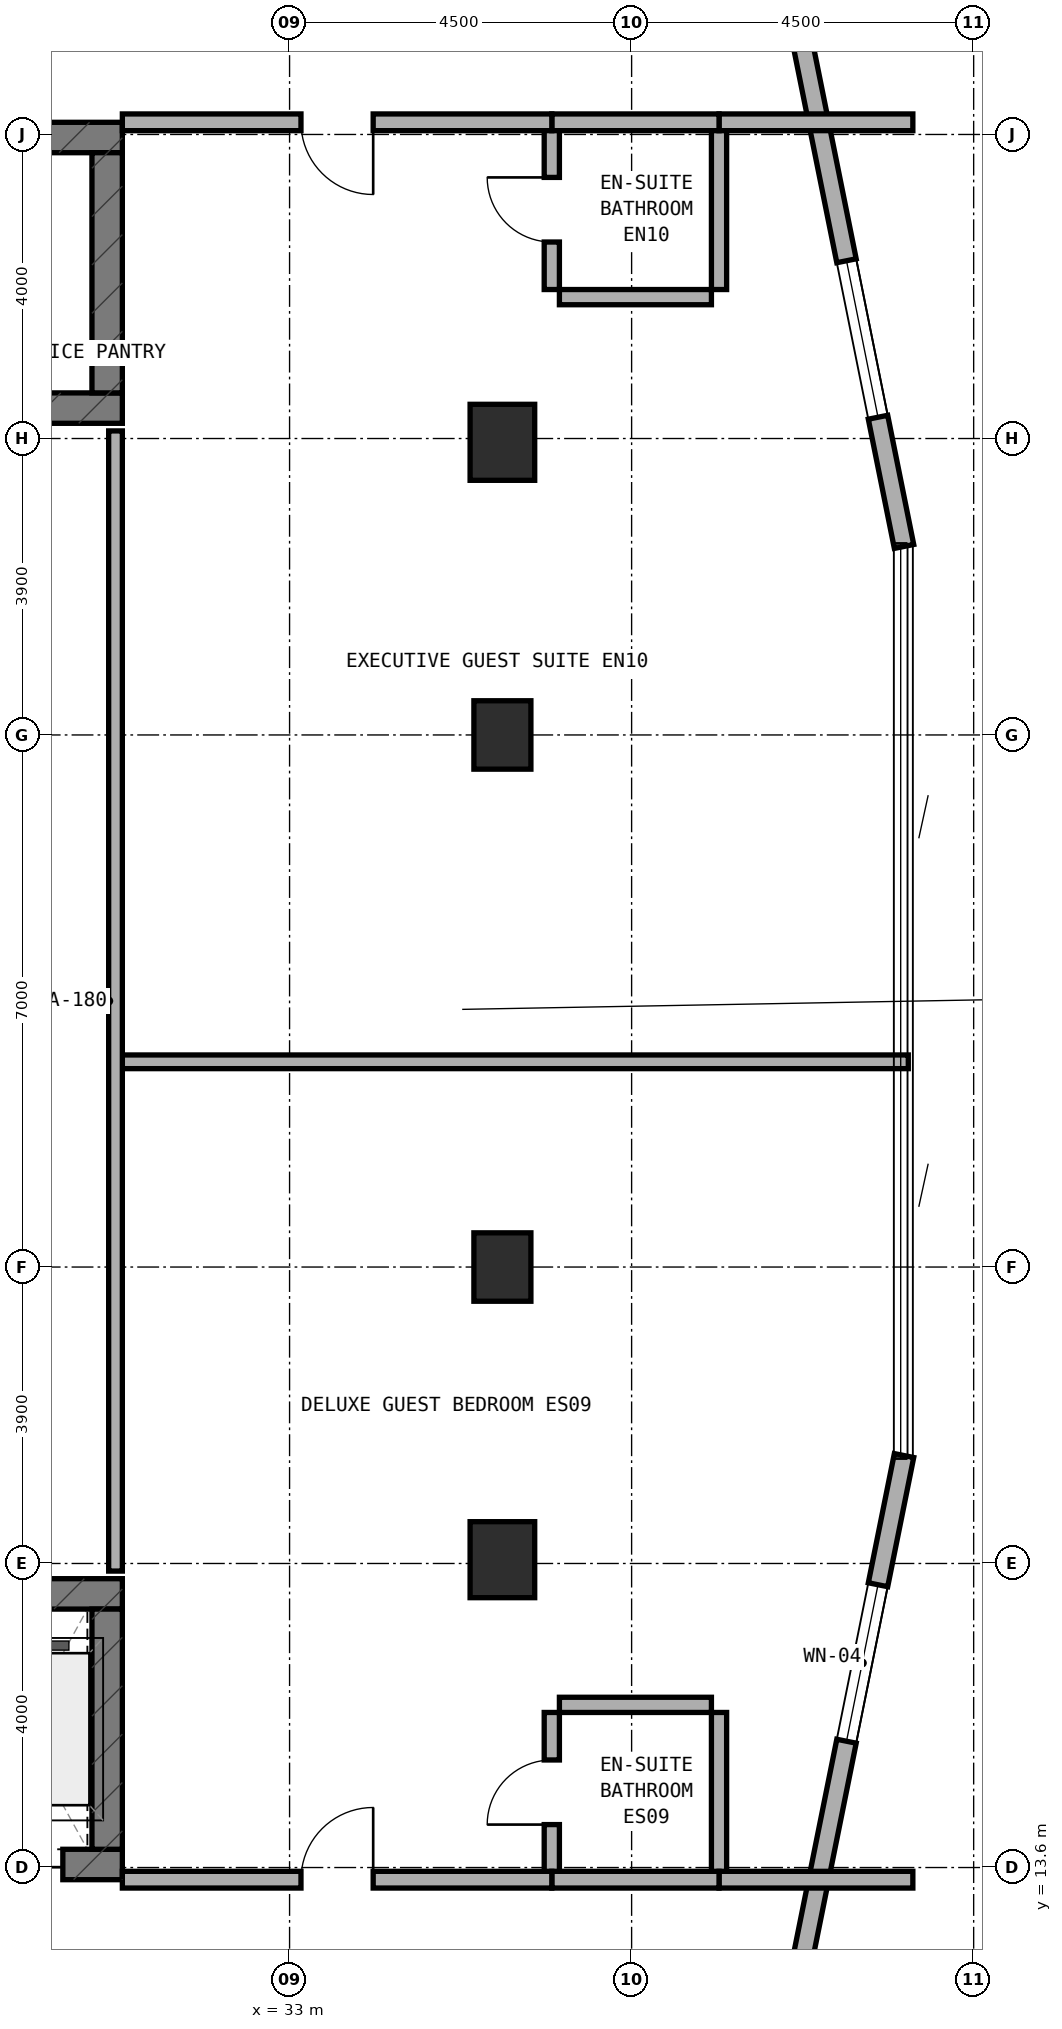
"""IFC4 building model, lengths in metres.
Left out: names, types, materials, properties, quantities, classifications, styles, units other than length and angle.
Written with IfcOpenShell. Run it as: python <this file> out.ifc"""

import sys

from ifc_helpers import new_model, si_unit, direction, frame, frame_2d, origin, origin_2d, place, context, subcontext, project, spatial, rectangle, extrude, element, fill, save


model = new_model("IFC4")
c1 = context("Model", 3, precision=1e-05, world=origin(), true_north=direction((0.0, 1.0)))
c2 = subcontext(c1, "Body", "Model", "MODEL_VIEW")
j1 = project(units=[si_unit("LENGTHUNIT", "METRE"), si_unit("PLANEANGLEUNIT", "RADIAN")], contexts=[c1])
p1 = place(None, origin())
s1 = spatial("IfcSite", under=j1, at=p1, CompositionType="ELEMENT")
p2 = place(p1, origin())
s2 = spatial("IfcBuilding", under=s1, at=p2, CompositionType="ELEMENT")
p3 = place(p2, frame((0.0, 0.0, 145.0)))
s3 = spatial("IfcBuildingStorey", under=s2, at=p3, CompositionType="ELEMENT", Elevation=145.0)
p4 = place(p3, frame((6.4, 32.8, 0.0), z_axis=(0.0, 0.0, 1.0), x_axis=(1.0, 0.0, 0.0)))
e1 = element("IfcWall", 1, at=p4, inside=s3, PredefinedType="SHEAR", context=c2, shape_type="SweptSolid", body=[
    extrude(rectangle(XDim=24.4, YDim=0.4, at=frame_2d((12.2, 0.0))), origin(), (0.0, 0.0, 1.0), 3.5),
])
p5 = place(p4, frame((6.05, 0.0, 0.0)))
e2 = element("IfcOpeningElement", 2, at=p5, cuts=e1, PredefinedType="OPENING", context=c2, shape_type="SweptSolid", body=[
    extrude(rectangle(XDim=1.1, YDim=2.15, at=frame_2d((0.55, 1.075))), frame((0.0, 0.21, 0.0), z_axis=(0.0, -1.0, 0.0), x_axis=(1.0, 0.0, 0.0)), (0.0, 0.0, 1.0), 0.42),
])
p6 = place(p3, frame((6.4, 36.36, 0.0), z_axis=(0.0, 0.0, 1.0), x_axis=(1.0, 0.0, 0.0)))
e3 = element("IfcWall", 3, at=p6, inside=s3, PredefinedType="SHEAR", context=c2, shape_type="SweptSolid", body=[
    extrude(rectangle(XDim=24.4, YDim=0.4, at=frame_2d((12.2, 0.0))), origin(), (0.0, 0.0, 1.0), 3.5),
])
p7 = place(p6, frame((9.15, 0.0, 0.0)))
e4 = element("IfcOpeningElement", 4, at=p7, cuts=e3, PredefinedType="OPENING", context=c2, shape_type="SweptSolid", body=[
    extrude(rectangle(XDim=1.2, YDim=2.15, at=frame_2d((0.6, 1.075))), frame((0.0, 0.21, 0.0), z_axis=(0.0, -1.0, 0.0), x_axis=(1.0, 0.0, 0.0)), (0.0, 0.0, 1.0), 0.42),
])
p8 = place(p6, frame((19.2, 0.0, 0.0)))
e5 = element("IfcOpeningElement", 5, at=p8, cuts=e3, PredefinedType="OPENING", context=c2, shape_type="SweptSolid", body=[
    extrude(rectangle(XDim=0.85, YDim=2.1, at=frame_2d((0.425, 1.05))), frame((0.0, 0.21, 0.0), z_axis=(0.0, -1.0, 0.0), x_axis=(1.0, 0.0, 0.0)), (0.0, 0.0, 1.0), 0.42),
])
p9 = place(p6, frame((17.22, 0.0, 0.0)))
e6 = element("IfcOpeningElement", 6, at=p9, cuts=e3, PredefinedType="OPENING", context=c2, shape_type="SweptSolid", body=[
    extrude(rectangle(XDim=0.85, YDim=2.1, at=frame_2d((0.425, 1.05))), frame((0.0, 0.21, 0.0), z_axis=(0.0, -1.0, 0.0), x_axis=(1.0, 0.0, 0.0)), (0.0, 0.0, 1.0), 0.42),
])
p10 = place(p3, frame((30.6, 33.0, 0.0), z_axis=(0.0, 0.0, 1.0), x_axis=(0.0, 1.0, 0.0)))
e7 = element("IfcWall", 7, at=p10, inside=s3, PredefinedType="SHEAR", context=c2, shape_type="SweptSolid", body=[
    extrude(rectangle(XDim=3.16, YDim=0.4, at=frame_2d((1.58, 0.0))), origin(), (0.0, 0.0, 1.0), 3.5),
])
p11 = place(p3, frame((6.4, 13.64, 0.0), z_axis=(0.0, 0.0, 1.0), x_axis=(1.0, 0.0, 0.0)))
e8 = element("IfcWall", 8, at=p11, inside=s3, PredefinedType="SHEAR", context=c2, shape_type="SweptSolid", body=[
    extrude(rectangle(XDim=24.4, YDim=0.4, at=frame_2d((12.2, 0.0))), origin(), (0.0, 0.0, 1.0), 3.5),
])
p12 = place(p11, frame((9.15, 0.0, 0.0)))
e9 = element("IfcOpeningElement", 9, at=p12, cuts=e8, PredefinedType="OPENING", context=c2, shape_type="SweptSolid", body=[
    extrude(rectangle(XDim=1.2, YDim=2.15, at=frame_2d((0.6, 1.075))), frame((0.0, 0.21, 0.0), z_axis=(0.0, -1.0, 0.0), x_axis=(1.0, 0.0, 0.0)), (0.0, 0.0, 1.0), 0.42),
])
p13 = place(p11, frame((17.22, 0.0, 0.0)))
e10 = element("IfcOpeningElement", 10, at=p13, cuts=e8, PredefinedType="OPENING", context=c2, shape_type="SweptSolid", body=[
    extrude(rectangle(XDim=0.85, YDim=2.1, at=frame_2d((0.425, 1.05))), frame((0.0, 0.21, 0.0), z_axis=(0.0, -1.0, 0.0), x_axis=(1.0, 0.0, 0.0)), (0.0, 0.0, 1.0), 0.42),
])
p14 = place(p11, frame((18.783, 0.0, 0.0)))
e11 = element("IfcOpeningElement", 11, at=p14, cuts=e8, PredefinedType="OPENING", context=c2, shape_type="SweptSolid", body=[
    extrude(rectangle(XDim=1.1, YDim=2.15, at=frame_2d((0.55, 1.075))), frame((0.0, 0.21, 0.0), z_axis=(0.0, -1.0, 0.0), x_axis=(1.0, 0.0, 0.0)), (0.0, 0.0, 1.0), 0.42),
])
p15 = place(p11, frame((20.65, 0.0, 0.0)))
e12 = element("IfcOpeningElement", 12, at=p15, cuts=e8, PredefinedType="OPENING", context=c2, shape_type="SweptSolid", body=[
    extrude(rectangle(XDim=1.1, YDim=2.15, at=frame_2d((0.55, 1.075))), frame((0.0, 0.21, 0.0), z_axis=(0.0, -1.0, 0.0), x_axis=(1.0, 0.0, 0.0)), (0.0, 0.0, 1.0), 0.42),
])
p16 = place(p11, frame((22.517, 0.0, 0.0)))
e13 = element("IfcOpeningElement", 13, at=p16, cuts=e8, PredefinedType="OPENING", context=c2, shape_type="SweptSolid", body=[
    extrude(rectangle(XDim=1.1, YDim=2.15, at=frame_2d((0.55, 1.075))), frame((0.0, 0.21, 0.0), z_axis=(0.0, -1.0, 0.0), x_axis=(1.0, 0.0, 0.0)), (0.0, 0.0, 1.0), 0.42),
])
p17 = place(p3, frame((6.4, 17.2, 0.0), z_axis=(0.0, 0.0, 1.0), x_axis=(1.0, 0.0, 0.0)))
e14 = element("IfcWall", 14, at=p17, inside=s3, PredefinedType="SHEAR", context=c2, shape_type="SweptSolid", body=[
    extrude(rectangle(XDim=24.4, YDim=0.4, at=frame_2d((12.2, 0.0))), origin(), (0.0, 0.0, 1.0), 3.5),
])
p18 = place(p3, frame((30.6, 13.84, 0.0), z_axis=(0.0, 0.0, 1.0), x_axis=(0.0, 1.0, 0.0)))
e15 = element("IfcWall", 15, at=p18, inside=s3, PredefinedType="SHEAR", context=c2, shape_type="SweptSolid", body=[
    extrude(rectangle(XDim=3.16, YDim=0.4, at=frame_2d((1.58, 0.0))), origin(), (0.0, 0.0, 1.0), 3.5),
])
for number, where, z_axis, x_axis in (
    (16, (35.8, 21.5, 0.0), (0.0, 0.0, 1.0), (1.0, 0.0, 0.0)),
    (17, (35.8, 28.5, 0.0), (0.0, 0.0, 1.0), (1.0, 0.0, 0.0)),
):
    element("IfcColumn", number, at=place(p3, frame(where, z_axis=z_axis, x_axis=x_axis)), inside=s3, PredefinedType="COLUMN", context=c2, shape_type="SweptSolid", body=[
        extrude(rectangle(XDim=0.75, YDim=0.9, at=origin_2d()), origin(), (0.0, 0.0, 1.0), 3.5),
    ])
for number, where, z_axis, x_axis in (
    (18, (35.8, 17.65, 0.0), (0.0, 0.0, 1.0), (1.0, 0.0, 0.0)),
    (19, (35.8, 32.35, 0.0), (0.0, 0.0, 1.0), (1.0, 0.0, 0.0)),
):
    element("IfcColumn", number, at=place(p3, frame(where, z_axis=z_axis, x_axis=x_axis)), inside=s3, PredefinedType="COLUMN", context=c2, shape_type="SweptSolid", body=[
        extrude(rectangle(XDim=0.85, YDim=1.0, at=origin_2d()), origin(), (0.0, 0.0, 1.0), 3.5),
    ])
p19 = place(p3, frame((39.271, 10.018, 0.0), z_axis=(0.0, 0.0, 1.0), x_axis=(0.197435082048, 0.980315963543, 0.0)))
e20 = element("IfcWall", 20, at=p19, inside=s3, PredefinedType="STANDARD", context=c2, shape_type="SweptSolid", body=[
    extrude(rectangle(XDim=9.183, YDim=0.26, at=frame_2d((4.591, 0.0))), origin(), (0.0, 0.0, 1.0), 3.22),
])
p20 = place(p19, frame((5.349, 0.0, 0.85)))
e21 = element("IfcOpeningElement", 21, at=p20, cuts=e20, PredefinedType="OPENING", context=c2, shape_type="SweptSolid", body=[
    extrude(rectangle(XDim=2.1, YDim=1.5, at=frame_2d((1.05, 0.75))), frame((0.0, 0.14, 0.0), z_axis=(0.0, -1.0, 0.0), x_axis=(1.0, 0.0, 0.0)), (0.0, 0.0, 1.0), 0.28),
])
p21 = place(p3, frame((41.084, 30.98, 0.0), z_axis=(0.0, 0.0, 1.0), x_axis=(-0.197435082048, 0.980315963543, 0.0)))
e22 = element("IfcWall", 22, at=p21, inside=s3, PredefinedType="STANDARD", context=c2, shape_type="SweptSolid", body=[
    extrude(rectangle(XDim=9.183, YDim=0.26, at=frame_2d((4.591, 0.0))), origin(), (0.0, 0.0, 1.0), 3.22),
])
p22 = place(p21, frame((1.734, 0.0, 0.85)))
e23 = element("IfcOpeningElement", 23, at=p22, cuts=e22, PredefinedType="OPENING", context=c2, shape_type="SweptSolid", body=[
    extrude(rectangle(XDim=2.1, YDim=1.5, at=frame_2d((1.05, 0.75))), frame((0.0, 0.14, 0.0), z_axis=(0.0, -1.0, 0.0), x_axis=(1.0, 0.0, 0.0)), (0.0, 0.0, 1.0), 0.28),
])
p23 = place(p3, frame((30.8, 24.2, 0.0), z_axis=(0.0, 0.0, 1.0), x_axis=(1.0, 0.0, 0.0)))
e24 = element("IfcWall", 24, at=p23, inside=s3, PredefinedType="SOLIDWALL", context=c2, shape_type="SweptSolid", body=[
    extrude(rectangle(XDim=10.34, YDim=0.18, at=frame_2d((5.17, 0.0))), origin(), (0.0, 0.0, 1.0), 2.835),
])
p24 = place(p3, frame((30.71, 17.5, 0.0), z_axis=(0.0, 0.0, 1.0), x_axis=(0.0, 1.0, 0.0)))
e25 = element("IfcWall", 25, at=p24, inside=s3, PredefinedType="SOLIDWALL", context=c2, shape_type="SweptSolid", body=[
    extrude(rectangle(XDim=15.0, YDim=0.18, at=frame_2d((7.5, 0.0))), origin(), (0.0, 0.0, 1.0), 2.795),
])
p25 = place(p3, frame((36.45, 13.54, 0.0), z_axis=(0.0, 0.0, 1.0), x_axis=(0.0, 1.0, 0.0)))
e26 = element("IfcWall", 26, at=p25, inside=s3, PredefinedType="PLUMBINGWALL", context=c2, shape_type="SweptSolid", body=[
    extrude(rectangle(XDim=2.1, YDim=0.2, at=frame_2d((1.05, 0.0))), origin(), (0.0, 0.0, 1.0), 3.22),
])
p26 = place(p25, frame((0.625, 0.0, 0.0)))
e27 = element("IfcOpeningElement", 27, at=p26, cuts=e26, PredefinedType="OPENING", context=c2, shape_type="SweptSolid", body=[
    extrude(rectangle(XDim=0.85, YDim=2.1, at=frame_2d((0.425, 1.05))), frame((0.0, 0.11, 0.0), z_axis=(0.0, -1.0, 0.0), x_axis=(1.0, 0.0, 0.0)), (0.0, 0.0, 1.0), 0.22),
])
p27 = place(p3, frame((36.55, 15.74, 0.0), z_axis=(0.0, 0.0, 1.0), x_axis=(1.0, 0.0, 0.0)))
e28 = element("IfcWall", 28, at=p27, inside=s3, PredefinedType="PLUMBINGWALL", context=c2, shape_type="SweptSolid", body=[
    extrude(rectangle(XDim=2.0, YDim=0.2, at=frame_2d((1.0, 0.0))), origin(), (0.0, 0.0, 1.0), 3.22),
])
p28 = place(p3, frame((38.65, 13.54, 0.0), z_axis=(0.0, 0.0, 1.0), x_axis=(0.0, 1.0, 0.0)))
e29 = element("IfcWall", 29, at=p28, inside=s3, PredefinedType="PLUMBINGWALL", context=c2, shape_type="SweptSolid", body=[
    extrude(rectangle(XDim=2.1, YDim=0.2, at=frame_2d((1.05, 0.0))), origin(), (0.0, 0.0, 1.0), 3.22),
])
p29 = place(p3, frame((38.65, 13.44, 0.0), z_axis=(0.0, 0.0, 1.0), x_axis=(1.0, 0.0, 0.0)))
e30 = element("IfcWall", 30, at=p29, inside=s3, PredefinedType="SOLIDWALL", context=c2, shape_type="SweptSolid", body=[
    extrude(rectangle(XDim=2.55, YDim=0.22, at=frame_2d((1.275, 0.0))), origin(), (0.0, 0.0, 1.0), 3.22),
])
p30 = place(p3, frame((36.45, 13.44, 0.0), z_axis=(0.0, 0.0, 1.0), x_axis=(1.0, 0.0, 0.0)))
e31 = element("IfcWall", 31, at=p30, inside=s3, PredefinedType="SOLIDWALL", context=c2, shape_type="SweptSolid", body=[
    extrude(rectangle(XDim=2.2, YDim=0.22, at=frame_2d((1.1, 0.0))), origin(), (0.0, 0.0, 1.0), 3.22),
])
p31 = place(p3, frame((30.8, 13.44, 0.0), z_axis=(0.0, 0.0, 1.0), x_axis=(1.0, 0.0, 0.0)))
e32 = element("IfcWall", 32, at=p31, inside=s3, PredefinedType="SOLIDWALL", context=c2, shape_type="SweptSolid", body=[
    extrude(rectangle(XDim=5.65, YDim=0.22, at=frame_2d((2.825, 0.0))), origin(), (0.0, 0.0, 1.0), 2.795),
])
p32 = place(p31, frame((2.35, 0.0, 0.0)))
e33 = element("IfcOpeningElement", 33, at=p32, cuts=e32, PredefinedType="OPENING", context=c2, shape_type="SweptSolid", body=[
    extrude(rectangle(XDim=0.95, YDim=2.1, at=frame_2d((0.475, 1.05))), frame((0.0, 0.12, 0.0), z_axis=(0.0, -1.0, 0.0), x_axis=(1.0, 0.0, 0.0)), (0.0, 0.0, 1.0), 0.24),
])
p33 = place(p3, frame((36.45, 34.36, 0.0), z_axis=(0.0, 0.0, 1.0), x_axis=(0.0, 1.0, 0.0)))
e34 = element("IfcWall", 34, at=p33, inside=s3, PredefinedType="PLUMBINGWALL", context=c2, shape_type="SweptSolid", body=[
    extrude(rectangle(XDim=2.1, YDim=0.2, at=frame_2d((1.05, 0.0))), origin(), (0.0, 0.0, 1.0), 3.22),
])
p34 = place(p33, frame((0.625, 0.0, 0.0)))
e35 = element("IfcOpeningElement", 35, at=p34, cuts=e34, PredefinedType="OPENING", context=c2, shape_type="SweptSolid", body=[
    extrude(rectangle(XDim=0.85, YDim=2.1, at=frame_2d((0.425, 1.05))), frame((0.0, 0.11, 0.0), z_axis=(0.0, -1.0, 0.0), x_axis=(1.0, 0.0, 0.0)), (0.0, 0.0, 1.0), 0.22),
])
p35 = place(p3, frame((36.55, 34.26, 0.0), z_axis=(0.0, 0.0, 1.0), x_axis=(1.0, 0.0, 0.0)))
e36 = element("IfcWall", 36, at=p35, inside=s3, PredefinedType="PLUMBINGWALL", context=c2, shape_type="SweptSolid", body=[
    extrude(rectangle(XDim=2.0, YDim=0.2, at=frame_2d((1.0, 0.0))), origin(), (0.0, 0.0, 1.0), 3.22),
])
p36 = place(p3, frame((38.65, 34.36, 0.0), z_axis=(0.0, 0.0, 1.0), x_axis=(0.0, 1.0, 0.0)))
e37 = element("IfcWall", 37, at=p36, inside=s3, PredefinedType="PLUMBINGWALL", context=c2, shape_type="SweptSolid", body=[
    extrude(rectangle(XDim=2.1, YDim=0.2, at=frame_2d((1.05, 0.0))), origin(), (0.0, 0.0, 1.0), 3.22),
])
p37 = place(p3, frame((38.65, 36.56, 0.0), z_axis=(0.0, 0.0, 1.0), x_axis=(1.0, 0.0, 0.0)))
e38 = element("IfcWall", 38, at=p37, inside=s3, PredefinedType="SOLIDWALL", context=c2, shape_type="SweptSolid", body=[
    extrude(rectangle(XDim=2.55, YDim=0.22, at=frame_2d((1.275, 0.0))), origin(), (0.0, 0.0, 1.0), 3.22),
])
p38 = place(p3, frame((36.45, 36.56, 0.0), z_axis=(0.0, 0.0, 1.0), x_axis=(1.0, 0.0, 0.0)))
e39 = element("IfcWall", 39, at=p38, inside=s3, PredefinedType="SOLIDWALL", context=c2, shape_type="SweptSolid", body=[
    extrude(rectangle(XDim=2.2, YDim=0.22, at=frame_2d((1.1, 0.0))), origin(), (0.0, 0.0, 1.0), 3.22),
])
p39 = place(p3, frame((30.8, 36.56, 0.0), z_axis=(0.0, 0.0, 1.0), x_axis=(1.0, 0.0, 0.0)))
e40 = element("IfcWall", 40, at=p39, inside=s3, PredefinedType="SOLIDWALL", context=c2, shape_type="SweptSolid", body=[
    extrude(rectangle(XDim=5.65, YDim=0.22, at=frame_2d((2.825, 0.0))), origin(), (0.0, 0.0, 1.0), 2.795),
])
p40 = place(p39, frame((2.35, 0.0, 0.0)))
e41 = element("IfcOpeningElement", 41, at=p40, cuts=e40, PredefinedType="OPENING", context=c2, shape_type="SweptSolid", body=[
    extrude(rectangle(XDim=0.95, YDim=2.1, at=frame_2d((0.475, 1.05))), frame((0.0, 0.12, 0.0), z_axis=(0.0, -1.0, 0.0), x_axis=(1.0, 0.0, 0.0)), (0.0, 0.0, 1.0), 0.24),
])
p41 = place(p20, origin())
e42 = element("IfcWindow", 42, at=p41, inside=s3, PartitioningType="SINGLE_PANEL", PredefinedType="WINDOW", context=c2, shape_type="SweptSolid", body=[
    extrude(rectangle(XDim=2.1, YDim=1.5, at=frame_2d((1.05, 0.75))), frame((0.0, 0.03, 0.0), z_axis=(0.0, -1.0, 0.0), x_axis=(1.0, 0.0, 0.0)), (0.0, 0.0, 1.0), 0.06),
])
fill(e21, e42)
p42 = place(p22, origin())
e43 = element("IfcWindow", 43, at=p42, inside=s3, PartitioningType="SINGLE_PANEL", PredefinedType="WINDOW", context=c2, shape_type="SweptSolid", body=[
    extrude(rectangle(XDim=2.1, YDim=1.5, at=frame_2d((1.05, 0.75))), frame((0.0, 0.03, 0.0), z_axis=(0.0, -1.0, 0.0), x_axis=(1.0, 0.0, 0.0)), (0.0, 0.0, 1.0), 0.06),
])
fill(e23, e43)
p43 = place(p16, frame((1.1, 0.0, 0.0), z_axis=(0.0, 0.0, 1.0), x_axis=(-1.0, 0.0, 0.0)))
e44 = element("IfcDoor", 44, at=p43, inside=s3, OperationType="DOUBLE_DOOR_SLIDING", PredefinedType="DOOR", context=c2, shape_type="SweptSolid", body=[
    extrude(rectangle(XDim=1.1, YDim=2.15, at=frame_2d((0.55, 1.075))), frame((0.0, 0.025, 0.0), z_axis=(0.0, -1.0, 0.0), x_axis=(1.0, 0.0, 0.0)), (0.0, 0.0, 1.0), 0.05),
])
fill(e13, e44)
p44 = place(p26, origin())
e45 = element("IfcDoor", 45, at=p44, inside=s3, OperationType="SINGLE_SWING_LEFT", PredefinedType="DOOR", context=c2, shape_type="SweptSolid", body=[
    extrude(rectangle(XDim=0.85, YDim=2.1, at=frame_2d((0.425, 1.05))), frame((0.0, 0.025, 0.0), z_axis=(0.0, -1.0, 0.0), x_axis=(1.0, 0.0, 0.0)), (0.0, 0.0, 1.0), 0.05),
])
fill(e27, e45)
p45 = place(p32, origin())
e46 = element("IfcDoor", 46, at=p45, inside=s3, OperationType="SINGLE_SWING_RIGHT", PredefinedType="DOOR", context=c2, shape_type="SweptSolid", body=[
    extrude(rectangle(XDim=0.95, YDim=2.1, at=frame_2d((0.475, 1.05))), frame((0.0, 0.025, 0.0), z_axis=(0.0, -1.0, 0.0), x_axis=(1.0, 0.0, 0.0)), (0.0, 0.0, 1.0), 0.05),
])
fill(e33, e46)
p46 = place(p34, origin())
e47 = element("IfcDoor", 47, at=p46, inside=s3, OperationType="SINGLE_SWING_RIGHT", PredefinedType="DOOR", context=c2, shape_type="SweptSolid", body=[
    extrude(rectangle(XDim=0.85, YDim=2.1, at=frame_2d((0.425, 1.05))), frame((0.0, 0.025, 0.0), z_axis=(0.0, -1.0, 0.0), x_axis=(1.0, 0.0, 0.0)), (0.0, 0.0, 1.0), 0.05),
])
fill(e35, e47)
p47 = place(p40, frame((0.95, 0.0, 0.0), z_axis=(0.0, 0.0, 1.0), x_axis=(-1.0, 0.0, 0.0)))
e48 = element("IfcDoor", 48, at=p47, inside=s3, OperationType="SINGLE_SWING_LEFT", PredefinedType="DOOR", context=c2, shape_type="SweptSolid", body=[
    extrude(rectangle(XDim=0.95, YDim=2.1, at=frame_2d((0.475, 1.05))), frame((0.0, 0.025, 0.0), z_axis=(0.0, -1.0, 0.0), x_axis=(1.0, 0.0, 0.0)), (0.0, 0.0, 1.0), 0.05),
])
fill(e41, e48)
save(model, sys.argv[1])
